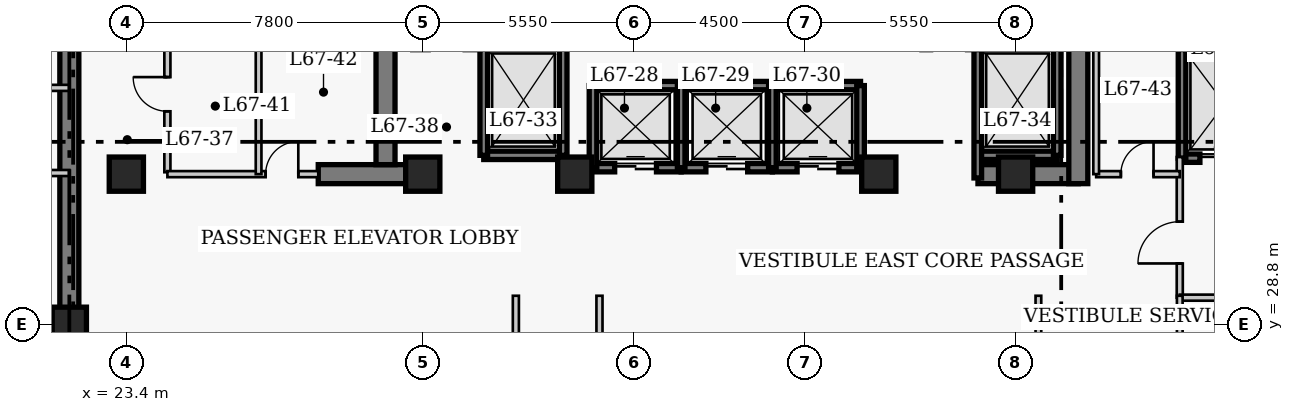
"""IFC4 building model, lengths in metres.
Left out: names, types, materials, properties, quantities, classifications, styles, units other than length and angle.
Written with IfcOpenShell. Run it as: python <this file> out.ifc"""

import sys

from ifc_helpers import new_model, si_unit, direction, frame, frame_2d, origin, origin_2d, place, context, subcontext, project, spatial, rectangle, extrude, element, fill, save


model = new_model("IFC4")
c1 = context("Model", 3, precision=1e-05, world=origin(), true_north=direction((0.0, 1.0)))
c2 = subcontext(c1, "Body", "Model", "MODEL_VIEW")
j1 = project(units=[si_unit("LENGTHUNIT", "METRE"), si_unit("PLANEANGLEUNIT", "RADIAN")], contexts=[c1])
p1 = place(None, origin())
s1 = spatial("IfcSite", under=j1, at=p1, CompositionType="ELEMENT")
p2 = place(p1, origin())
s2 = spatial("IfcBuilding", under=s1, at=p2, CompositionType="ELEMENT")
p3 = place(p2, frame((0.0, 0.0, 269.4)))
s3 = spatial("IfcBuildingStorey", under=s2, at=p3, CompositionType="ELEMENT", Elevation=269.4)
p4 = place(p3, frame((21.9, 27.05, 0.0), z_axis=(0.0, 0.0, 1.0), x_axis=(0.0, 1.0, 0.0)))
e1 = element("IfcWall", 1, at=p4, inside=s3, PredefinedType="SHEAR", context=c2, shape_type="SweptSolid", body=[
    extrude(rectangle(XDim=13.52, YDim=0.5, at=frame_2d((6.76, 0.0))), origin(), (0.0, 0.0, 1.0), 4.0),
])
p5 = place(p3, frame((28.45, 32.75, 0.0), z_axis=(0.0, 0.0, 1.0), x_axis=(1.0, 0.0, 0.0)))
e2 = element("IfcWall", 2, at=p5, inside=s3, PredefinedType="SHEAR", context=c2, shape_type="SweptSolid", body=[
    extrude(rectangle(XDim=2.4, YDim=0.5, at=frame_2d((1.2, 0.0))), origin(), (0.0, 0.0, 1.0), 4.0),
])
p6 = place(p3, frame((45.81, 32.75, 0.0), z_axis=(0.0, 0.0, 1.0), x_axis=(1.0, 0.0, 0.0)))
e3 = element("IfcWall", 3, at=p6, inside=s3, PredefinedType="SHEAR", context=c2, shape_type="SweptSolid", body=[
    extrude(rectangle(XDim=2.64, YDim=0.5, at=frame_2d((1.32, 0.0))), origin(), (0.0, 0.0, 1.0), 4.0),
])
p7 = place(p3, frame((30.22, 33.0, 0.0), z_axis=(0.0, 0.0, 1.0), x_axis=(0.0, 1.0, 0.0)))
e4 = element("IfcWall", 4, at=p7, inside=s3, PredefinedType="SHEAR", context=c2, shape_type="SweptSolid", body=[
    extrude(rectangle(XDim=7.32, YDim=0.5, at=frame_2d((3.66, 0.0))), origin(), (0.0, 0.0, 1.0), 4.0),
])
p8 = place(p3, frame((48.45, 32.5, 0.0), z_axis=(0.0, 0.0, 1.0), x_axis=(0.0, 1.0, 0.0)))
e5 = element("IfcWall", 5, at=p8, inside=s3, PredefinedType="SHEAR", context=c2, shape_type="SweptSolid", body=[
    extrude(rectangle(XDim=7.82, YDim=0.5, at=frame_2d((3.91, 0.0))), origin(), (0.0, 0.0, 1.0), 4.0),
])
p9 = place(p8, frame((5.7, 0.0, 0.0)))
e6 = element("IfcOpeningElement", 6, at=p9, cuts=e5, PredefinedType="OPENING", context=c2, shape_type="SweptSolid", body=[
    extrude(rectangle(XDim=1.1, YDim=2.15, at=frame_2d((0.55, 1.075))), frame((0.0, 0.26, 0.0), z_axis=(0.0, -1.0, 0.0), x_axis=(1.0, 0.0, 0.0)), (0.0, 0.0, 1.0), 0.52),
])
for number, where, z_axis, x_axis in (
    (7, (21.9, 28.8, 0.0), (0.0, 0.0, 1.0), (1.0, 0.0, 0.0)),
    (8, (23.4, 32.75, 0.0), (0.0, 0.0, 1.0), (1.0, 0.0, 0.0)),
    (9, (31.2, 32.75, 0.0), (0.0, 0.0, 1.0), (1.0, 0.0, 0.0)),
    (10, (35.2, 32.75, 0.0), (0.0, 0.0, 1.0), (1.0, 0.0, 0.0)),
    (11, (43.2, 32.75, 0.0), (0.0, 0.0, 1.0), (1.0, 0.0, 0.0)),
    (12, (46.8, 32.75, 0.0), (0.0, 0.0, 1.0), (1.0, 0.0, 0.0)),
):
    element("IfcColumn", number, at=place(p3, frame(where, z_axis=z_axis, x_axis=x_axis)), inside=s3, PredefinedType="COLUMN", context=c2, shape_type="SweptSolid", body=[
        extrude(rectangle(XDim=0.9, YDim=0.9, at=origin_2d()), origin(), (0.0, 0.0, 1.0), 4.0),
    ])
p10 = place(p3, frame((35.68, 35.08, 0.0), z_axis=(0.0, 0.0, 1.0), x_axis=(1.0, 0.0, 0.0)))
e13 = element("IfcWall", 13, at=p10, inside=s3, PredefinedType="SHEAR", context=c2, shape_type="SweptSolid", body=[
    extrude(rectangle(XDim=2.32, YDim=0.22, at=frame_2d((1.16, 0.0))), origin(), (0.0, 0.0, 1.0), 4.0),
])
p11 = place(p3, frame((35.68, 32.92, 0.0), z_axis=(0.0, 0.0, 1.0), x_axis=(1.0, 0.0, 0.0)))
e14 = element("IfcWall", 14, at=p11, inside=s3, PredefinedType="SHEAR", context=c2, shape_type="SweptSolid", body=[
    extrude(rectangle(XDim=2.32, YDim=0.22, at=frame_2d((1.16, 0.0))), origin(), (0.0, 0.0, 1.0), 4.0),
])
p12 = place(p11, frame((0.57, 0.0, 0.0)))
e15 = element("IfcOpeningElement", 15, at=p12, cuts=e14, PredefinedType="OPENING", context=c2, shape_type="SweptSolid", body=[
    extrude(rectangle(XDim=1.1, YDim=2.15, at=frame_2d((0.55, 1.075))), frame((0.0, 0.12, 0.0), z_axis=(0.0, -1.0, 0.0), x_axis=(1.0, 0.0, 0.0)), (0.0, 0.0, 1.0), 0.24),
])
p13 = place(p3, frame((35.68, 32.92, 0.0), z_axis=(0.0, 0.0, 1.0), x_axis=(0.0, 1.0, 0.0)))
e16 = element("IfcWall", 16, at=p13, inside=s3, PredefinedType="SHEAR", context=c2, shape_type="SweptSolid", body=[
    extrude(rectangle(XDim=2.16, YDim=0.2, at=frame_2d((1.08, 0.0))), origin(), (0.0, 0.0, 1.0), 4.0),
])
p14 = place(p3, frame((38.0, 35.08, 0.0), z_axis=(0.0, 0.0, 1.0), x_axis=(1.0, 0.0, 0.0)))
e17 = element("IfcWall", 17, at=p14, inside=s3, PredefinedType="SHEAR", context=c2, shape_type="SweptSolid", body=[
    extrude(rectangle(XDim=2.4, YDim=0.22, at=frame_2d((1.2, 0.0))), origin(), (0.0, 0.0, 1.0), 4.0),
])
p15 = place(p3, frame((38.0, 32.92, 0.0), z_axis=(0.0, 0.0, 1.0), x_axis=(1.0, 0.0, 0.0)))
e18 = element("IfcWall", 18, at=p15, inside=s3, PredefinedType="SHEAR", context=c2, shape_type="SweptSolid", body=[
    extrude(rectangle(XDim=2.4, YDim=0.22, at=frame_2d((1.2, 0.0))), origin(), (0.0, 0.0, 1.0), 4.0),
])
p16 = place(p15, frame((0.65, 0.0, 0.0)))
e19 = element("IfcOpeningElement", 19, at=p16, cuts=e18, PredefinedType="OPENING", context=c2, shape_type="SweptSolid", body=[
    extrude(rectangle(XDim=1.1, YDim=2.15, at=frame_2d((0.55, 1.075))), frame((0.0, 0.12, 0.0), z_axis=(0.0, -1.0, 0.0), x_axis=(1.0, 0.0, 0.0)), (0.0, 0.0, 1.0), 0.24),
])
p17 = place(p3, frame((38.0, 32.92, 0.0), z_axis=(0.0, 0.0, 1.0), x_axis=(0.0, 1.0, 0.0)))
e20 = element("IfcWall", 20, at=p17, inside=s3, PredefinedType="SHEAR", context=c2, shape_type="SweptSolid", body=[
    extrude(rectangle(XDim=2.16, YDim=0.2, at=frame_2d((1.08, 0.0))), origin(), (0.0, 0.0, 1.0), 4.0),
])
p18 = place(p3, frame((40.4, 35.08, 0.0), z_axis=(0.0, 0.0, 1.0), x_axis=(1.0, 0.0, 0.0)))
e21 = element("IfcWall", 21, at=p18, inside=s3, PredefinedType="SHEAR", context=c2, shape_type="SweptSolid", body=[
    extrude(rectangle(XDim=2.32, YDim=0.22, at=frame_2d((1.16, 0.0))), origin(), (0.0, 0.0, 1.0), 4.0),
])
p19 = place(p3, frame((40.4, 32.92, 0.0), z_axis=(0.0, 0.0, 1.0), x_axis=(1.0, 0.0, 0.0)))
e22 = element("IfcWall", 22, at=p19, inside=s3, PredefinedType="SHEAR", context=c2, shape_type="SweptSolid", body=[
    extrude(rectangle(XDim=2.32, YDim=0.22, at=frame_2d((1.16, 0.0))), origin(), (0.0, 0.0, 1.0), 4.0),
])
p20 = place(p19, frame((0.65, 0.0, 0.0)))
e23 = element("IfcOpeningElement", 23, at=p20, cuts=e22, PredefinedType="OPENING", context=c2, shape_type="SweptSolid", body=[
    extrude(rectangle(XDim=1.1, YDim=2.15, at=frame_2d((0.55, 1.075))), frame((0.0, 0.12, 0.0), z_axis=(0.0, -1.0, 0.0), x_axis=(1.0, 0.0, 0.0)), (0.0, 0.0, 1.0), 0.24),
])
for number, where, z_axis, x_axis in (
    (24, (40.4, 32.92, 0.0), (0.0, 0.0, 1.0), (0.0, 1.0, 0.0)),
    (25, (42.72, 32.92, 0.0), (0.0, 0.0, 1.0), (0.0, 1.0, 0.0)),
):
    element("IfcWall", number, at=place(p3, frame(where, z_axis=z_axis, x_axis=x_axis)), inside=s3, PredefinedType="SHEAR", context=c2, shape_type="SweptSolid", body=[
        extrude(rectangle(XDim=2.16, YDim=0.2, at=frame_2d((1.08, 0.0))), origin(), (0.0, 0.0, 1.0), 4.0),
    ])
p21 = place(p3, frame((51.18, 36.03, 0.0), z_axis=(0.0, 0.0, 1.0), x_axis=(1.0, 0.0, 0.0)))
e26 = element("IfcWall", 26, at=p21, inside=s3, PredefinedType="SHEAR", context=c2, shape_type="SweptSolid", body=[
    extrude(rectangle(XDim=2.42, YDim=0.22, at=frame_2d((1.21, 0.0))), origin(), (0.0, 0.0, 1.0), 4.0),
])
p22 = place(p3, frame((51.18, 33.17, 0.0), z_axis=(0.0, 0.0, 1.0), x_axis=(1.0, 0.0, 0.0)))
e27 = element("IfcWall", 27, at=p22, inside=s3, PredefinedType="SHEAR", context=c2, shape_type="SweptSolid", body=[
    extrude(rectangle(XDim=2.42, YDim=0.22, at=frame_2d((1.21, 0.0))), origin(), (0.0, 0.0, 1.0), 4.0),
])
p23 = place(p22, frame((0.47, 0.0, 0.0)))
e28 = element("IfcOpeningElement", 28, at=p23, cuts=e27, PredefinedType="OPENING", context=c2, shape_type="SweptSolid", body=[
    extrude(rectangle(XDim=1.3, YDim=2.15, at=frame_2d((0.65, 1.075))), frame((0.0, 0.12, 0.0), z_axis=(0.0, -1.0, 0.0), x_axis=(1.0, 0.0, 0.0)), (0.0, 0.0, 1.0), 0.24),
])
p24 = place(p3, frame((51.18, 33.17, 0.0), z_axis=(0.0, 0.0, 1.0), x_axis=(0.0, 1.0, 0.0)))
e29 = element("IfcWall", 29, at=p24, inside=s3, PredefinedType="SHEAR", context=c2, shape_type="SweptSolid", body=[
    extrude(rectangle(XDim=2.86, YDim=0.2, at=frame_2d((1.43, 0.0))), origin(), (0.0, 0.0, 1.0), 4.0),
])
p25 = place(p3, frame((32.805, 33.245, 0.0), z_axis=(0.0, 0.0, 1.0), x_axis=(1.0, 0.0, 0.0)))
e30 = element("IfcWall", 30, at=p25, inside=s3, PredefinedType="SHEAR", context=c2, shape_type="SweptSolid", body=[
    extrude(rectangle(XDim=2.09, YDim=0.22, at=frame_2d((1.045, 0.0))), origin(), (0.0, 0.0, 1.0), 4.0),
])
for number, where, z_axis, x_axis in (
    (31, (32.805, 33.245, 0.0), (0.0, 0.0, 1.0), (0.0, 1.0, 0.0)),
    (32, (34.895, 33.245, 0.0), (0.0, 0.0, 1.0), (0.0, 1.0, 0.0)),
):
    element("IfcWall", number, at=place(p3, frame(where, z_axis=z_axis, x_axis=x_axis)), inside=s3, PredefinedType="SHEAR", context=c2, shape_type="SweptSolid", body=[
        extrude(rectangle(XDim=2.91, YDim=0.2, at=frame_2d((1.455, 0.0))), origin(), (0.0, 0.0, 1.0), 4.0),
    ])
p26 = place(p3, frame((45.805, 33.245, 0.0), z_axis=(0.0, 0.0, 1.0), x_axis=(1.0, 0.0, 0.0)))
e33 = element("IfcWall", 33, at=p26, inside=s3, PredefinedType="SHEAR", context=c2, shape_type="SweptSolid", body=[
    extrude(rectangle(XDim=2.09, YDim=0.22, at=frame_2d((1.045, 0.0))), origin(), (0.0, 0.0, 1.0), 4.0),
])
p27 = place(p3, frame((45.805, 32.65, 0.0), z_axis=(0.0, 0.0, 1.0), x_axis=(0.0, 1.0, 0.0)))
e34 = element("IfcWall", 34, at=p27, inside=s3, PredefinedType="SHEAR", context=c2, shape_type="SweptSolid", body=[
    extrude(rectangle(XDim=3.505, YDim=0.2, at=frame_2d((1.752, 0.0))), origin(), (0.0, 0.0, 1.0), 4.0),
])
p28 = place(p3, frame((47.895, 33.245, 0.0), z_axis=(0.0, 0.0, 1.0), x_axis=(0.0, 1.0, 0.0)))
e35 = element("IfcWall", 35, at=p28, inside=s3, PredefinedType="SHEAR", context=c2, shape_type="SweptSolid", body=[
    extrude(rectangle(XDim=2.91, YDim=0.2, at=frame_2d((1.455, 0.0))), origin(), (0.0, 0.0, 1.0), 4.0),
])
p29 = place(p3, frame((24.48, 32.8, 0.0), z_axis=(0.0, 0.0, 1.0), x_axis=(0.0, 1.0, 0.0)))
e36 = element("IfcWall", 36, at=p29, inside=s3, PredefinedType="PARTITIONING", context=c2, shape_type="SweptSolid", body=[
    extrude(rectangle(XDim=3.57, YDim=0.16, at=frame_2d((1.785, 0.0))), origin(), (0.0, 0.0, 1.0), 3.76),
])
p30 = place(p29, frame((1.604, 0.0, 0.0)))
e37 = element("IfcOpeningElement", 37, at=p30, cuts=e36, PredefinedType="OPENING", context=c2, shape_type="SweptSolid", body=[
    extrude(rectangle(XDim=0.9, YDim=2.1, at=frame_2d((0.45, 1.05))), frame((0.0, 0.09, 0.0), z_axis=(0.0, -1.0, 0.0), x_axis=(1.0, 0.0, 0.0)), (0.0, 0.0, 1.0), 0.18),
])
p31 = place(p3, frame((51.12, 29.5, 0.0), z_axis=(0.0, 0.0, 1.0), x_axis=(0.0, 1.0, 0.0)))
e38 = element("IfcWall", 38, at=p31, inside=s3, PredefinedType="PARTITIONING", context=c2, shape_type="SweptSolid", body=[
    extrude(rectangle(XDim=3.7, YDim=0.16, at=frame_2d((1.85, 0.0))), origin(), (0.0, 0.0, 1.0), 3.76),
])
p32 = place(p31, frame((0.9, 0.0, 0.0)))
e39 = element("IfcOpeningElement", 39, at=p32, cuts=e38, PredefinedType="OPENING", context=c2, shape_type="SweptSolid", body=[
    extrude(rectangle(XDim=1.1, YDim=2.15, at=frame_2d((0.55, 1.075))), frame((0.0, 0.09, 0.0), z_axis=(0.0, -1.0, 0.0), x_axis=(1.0, 0.0, 0.0)), (0.0, 0.0, 1.0), 0.18),
])
p33 = place(p3, frame((51.12, 29.5, 0.0), z_axis=(0.0, 0.0, 1.0), x_axis=(1.0, 0.0, 0.0)))
e40 = element("IfcWall", 40, at=p33, inside=s3, PredefinedType="PARTITIONING", context=c2, shape_type="SweptSolid", body=[
    extrude(rectangle(XDim=5.63, YDim=0.16, at=frame_2d((2.815, 0.0))), origin(), (0.0, 0.0, 1.0), 3.76),
])
p34 = place(p3, frame((24.48, 32.75, 0.0), z_axis=(0.0, 0.0, 1.0), x_axis=(1.0, 0.0, 0.0)))
e41 = element("IfcWall", 41, at=p34, inside=s3, PredefinedType="PARTITIONING", context=c2, shape_type="SweptSolid", body=[
    extrude(rectangle(XDim=3.97, YDim=0.16, at=frame_2d((1.985, 0.0))), origin(), (0.0, 0.0, 1.0), 3.76),
])
p35 = place(p34, frame((2.585, 0.0, 0.0)))
e42 = element("IfcOpeningElement", 42, at=p35, cuts=e41, PredefinedType="OPENING", context=c2, shape_type="SweptSolid", body=[
    extrude(rectangle(XDim=0.86, YDim=2.05, at=frame_2d((0.43, 1.025))), frame((0.0, 0.09, 0.0), z_axis=(0.0, -1.0, 0.0), x_axis=(1.0, 0.0, 0.0)), (0.0, 0.0, 1.0), 0.18),
])
p36 = place(p3, frame((48.92, 32.75, 0.0), z_axis=(0.0, 0.0, 1.0), x_axis=(1.0, 0.0, 0.0)))
e43 = element("IfcWall", 43, at=p36, inside=s3, PredefinedType="PARTITIONING", context=c2, shape_type="SweptSolid", body=[
    extrude(rectangle(XDim=2.2, YDim=0.16, at=frame_2d((1.1, 0.0))), origin(), (0.0, 0.0, 1.0), 3.76),
])
p37 = place(p36, frame((0.65, 0.0, 0.0)))
e44 = element("IfcOpeningElement", 44, at=p37, cuts=e43, PredefinedType="OPENING", context=c2, shape_type="SweptSolid", body=[
    extrude(rectangle(XDim=0.86, YDim=2.05, at=frame_2d((0.43, 1.025))), frame((0.0, 0.09, 0.0), z_axis=(0.0, -1.0, 0.0), x_axis=(1.0, 0.0, 0.0)), (0.0, 0.0, 1.0), 0.18),
])
for number, where, z_axis, x_axis in (
    (45, (48.92, 32.75, 0.0), (0.0, 0.0, 1.0), (0.0, 1.0, 0.0)),
    (46, (26.88, 32.75, 0.0), (0.0, 0.0, 1.0), (0.0, 1.0, 0.0)),
):
    element("IfcWall", number, at=place(p3, frame(where, z_axis=z_axis, x_axis=x_axis)), inside=s3, PredefinedType="PARTITIONING", context=c2, shape_type="SweptSolid", body=[
        extrude(rectangle(XDim=3.62, YDim=0.15, at=frame_2d((1.81, 0.0))), origin(), (0.0, 0.0, 1.0), 3.76),
    ])
for number, where, z_axis, x_axis in (
    (47, (33.65, 24.71, 0.0), (0.0, 0.0, 1.0), (0.0, 1.0, 0.0)),
    (48, (35.85, 24.71, 0.0), (0.0, 0.0, 1.0), (0.0, 1.0, 0.0)),
):
    element("IfcWall", number, at=place(p3, frame(where, z_axis=z_axis, x_axis=x_axis)), inside=s3, PredefinedType="PARTITIONING", context=c2, shape_type="SweptSolid", body=[
        extrude(rectangle(XDim=4.84, YDim=0.16, at=frame_2d((2.42, 0.0))), origin(), (0.0, 0.0, 1.0), 3.76),
    ])
for number, where, z_axis, x_axis in (
    (49, (19.16, 35.02, 0.0), (0.0, 0.0, 1.0), (1.0, 0.0, 0.0)),
    (50, (19.16, 32.78, 0.0), (0.0, 0.0, 1.0), (1.0, 0.0, 0.0)),
):
    element("IfcWall", number, at=place(p3, frame(where, z_axis=z_axis, x_axis=x_axis)), inside=s3, PredefinedType="PARTITIONING", context=c2, shape_type="SweptSolid", body=[
        extrude(rectangle(XDim=2.74, YDim=0.16, at=frame_2d((1.37, 0.0))), origin(), (0.0, 0.0, 1.0), 3.76),
    ])
for number, where, z_axis, x_axis in (
    (51, (47.4, 24.71, 0.0), (0.0, 0.0, 1.0), (0.0, 1.0, 0.0)),
    (52, (51.12, 24.71, 0.0), (0.0, 0.0, 1.0), (0.0, 1.0, 0.0)),
):
    element("IfcWall", number, at=place(p3, frame(where, z_axis=z_axis, x_axis=x_axis)), inside=s3, PredefinedType="PARTITIONING", context=c2, shape_type="SweptSolid", body=[
        extrude(rectangle(XDim=4.84, YDim=0.15, at=frame_2d((2.42, 0.0))), origin(), (0.0, 0.0, 1.0), 3.76),
    ])
p38 = place(p12, origin())
e53 = element("IfcDoor", 53, at=p38, inside=s3, OperationType="DOUBLE_DOOR_SLIDING", PredefinedType="DOOR", context=c2, shape_type="SweptSolid", body=[
    extrude(rectangle(XDim=1.1, YDim=2.15, at=frame_2d((0.55, 1.075))), frame((0.0, 0.025, 0.0), z_axis=(0.0, -1.0, 0.0), x_axis=(1.0, 0.0, 0.0)), (0.0, 0.0, 1.0), 0.05),
])
fill(e15, e53)
p39 = place(p16, origin())
e54 = element("IfcDoor", 54, at=p39, inside=s3, OperationType="DOUBLE_DOOR_SLIDING", PredefinedType="DOOR", context=c2, shape_type="SweptSolid", body=[
    extrude(rectangle(XDim=1.1, YDim=2.15, at=frame_2d((0.55, 1.075))), frame((0.0, 0.025, 0.0), z_axis=(0.0, -1.0, 0.0), x_axis=(1.0, 0.0, 0.0)), (0.0, 0.0, 1.0), 0.05),
])
fill(e19, e54)
p40 = place(p20, origin())
e55 = element("IfcDoor", 55, at=p40, inside=s3, OperationType="DOUBLE_DOOR_SLIDING", PredefinedType="DOOR", context=c2, shape_type="SweptSolid", body=[
    extrude(rectangle(XDim=1.1, YDim=2.15, at=frame_2d((0.55, 1.075))), frame((0.0, 0.025, 0.0), z_axis=(0.0, -1.0, 0.0), x_axis=(1.0, 0.0, 0.0)), (0.0, 0.0, 1.0), 0.05),
])
fill(e23, e55)
p41 = place(p23, origin())
e56 = element("IfcDoor", 56, at=p41, inside=s3, OperationType="DOUBLE_DOOR_SLIDING", PredefinedType="DOOR", context=c2, shape_type="SweptSolid", body=[
    extrude(rectangle(XDim=1.3, YDim=2.15, at=frame_2d((0.65, 1.075))), frame((0.0, 0.025, 0.0), z_axis=(0.0, -1.0, 0.0), x_axis=(1.0, 0.0, 0.0)), (0.0, 0.0, 1.0), 0.05),
])
fill(e28, e56)
p42 = place(p32, origin())
e57 = element("IfcDoor", 57, at=p42, inside=s3, OperationType="SINGLE_SWING_LEFT", PredefinedType="DOOR", context=c2, shape_type="SweptSolid", body=[
    extrude(rectangle(XDim=1.1, YDim=2.15, at=frame_2d((0.55, 1.075))), frame((0.0, 0.025, 0.0), z_axis=(0.0, -1.0, 0.0), x_axis=(1.0, 0.0, 0.0)), (0.0, 0.0, 1.0), 0.05),
])
fill(e39, e57)
p43 = place(p30, origin())
e58 = element("IfcDoor", 58, at=p43, inside=s3, OperationType="SINGLE_SWING_RIGHT", PredefinedType="DOOR", context=c2, shape_type="SweptSolid", body=[
    extrude(rectangle(XDim=0.9, YDim=2.1, at=frame_2d((0.45, 1.05))), frame((0.0, 0.025, 0.0), z_axis=(0.0, -1.0, 0.0), x_axis=(1.0, 0.0, 0.0)), (0.0, 0.0, 1.0), 0.05),
])
fill(e37, e58)
p44 = place(p35, origin())
e59 = element("IfcDoor", 59, at=p44, inside=s3, OperationType="SINGLE_SWING_RIGHT", PredefinedType="DOOR", context=c2, shape_type="SweptSolid", body=[
    extrude(rectangle(XDim=0.86, YDim=2.05, at=frame_2d((0.43, 1.025))), frame((0.0, 0.025, 0.0), z_axis=(0.0, -1.0, 0.0), x_axis=(1.0, 0.0, 0.0)), (0.0, 0.0, 1.0), 0.05),
])
fill(e42, e59)
p45 = place(p37, origin())
e60 = element("IfcDoor", 60, at=p45, inside=s3, OperationType="SINGLE_SWING_RIGHT", PredefinedType="DOOR", context=c2, shape_type="SweptSolid", body=[
    extrude(rectangle(XDim=0.86, YDim=2.05, at=frame_2d((0.43, 1.025))), frame((0.0, 0.025, 0.0), z_axis=(0.0, -1.0, 0.0), x_axis=(1.0, 0.0, 0.0)), (0.0, 0.0, 1.0), 0.05),
])
fill(e44, e60)
save(model, sys.argv[1])
